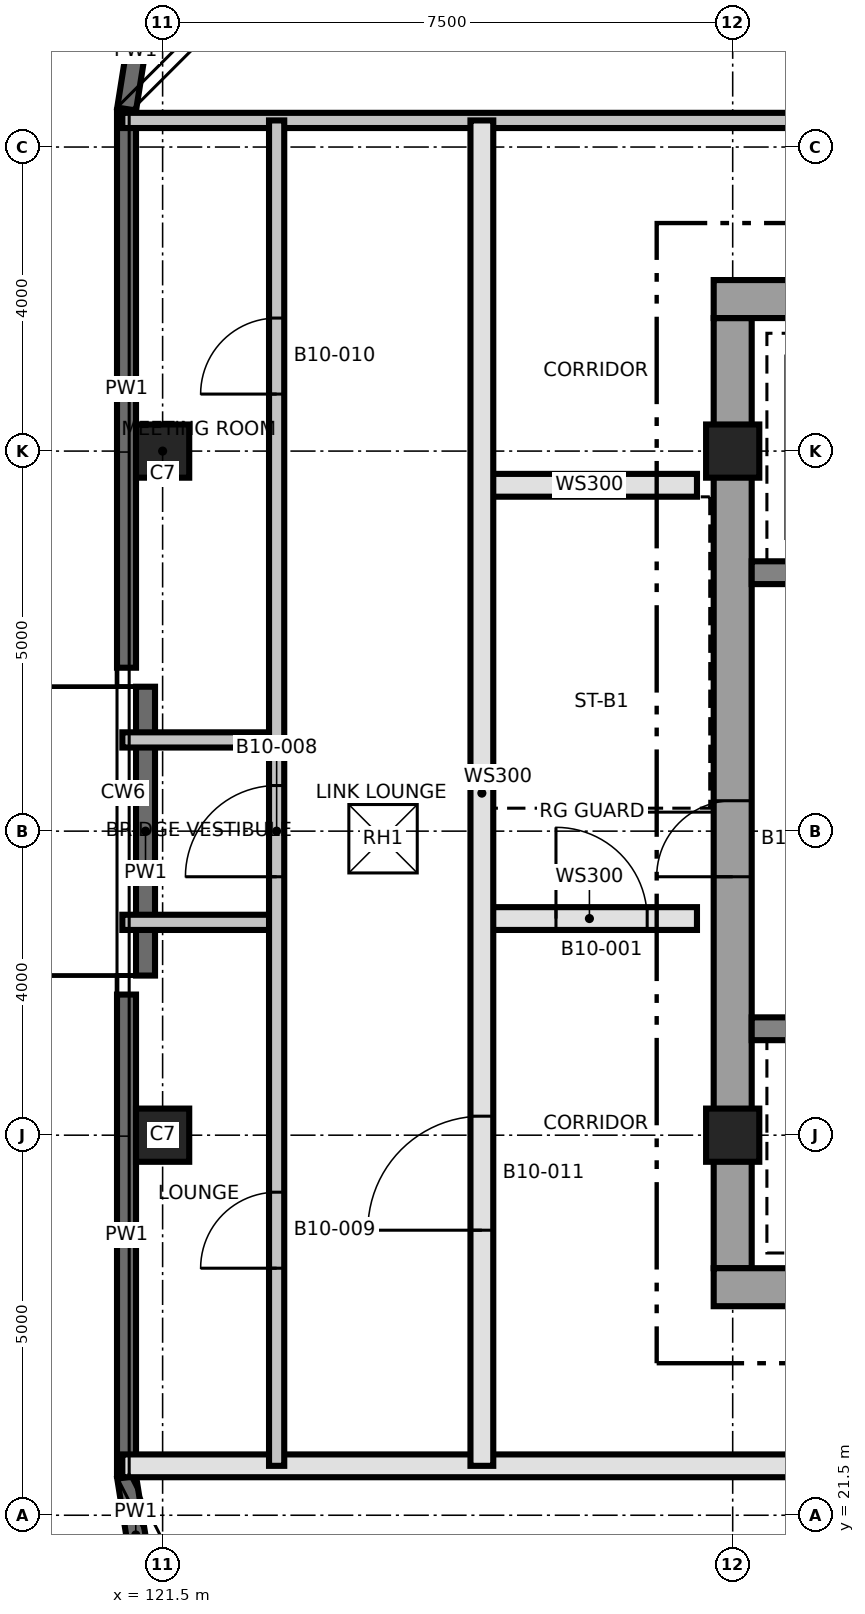
"""IFC4 building model, lengths in metres.
Left out: names, types, materials, properties, quantities, classifications, styles, units other than length and angle.
Written with IfcOpenShell. Run it as: python <this file> out.ifc"""

import sys

from ifc_helpers import new_model, si_unit, direction, frame, frame_2d, origin, origin_2d, place, context, subcontext, project, spatial, rectangle, extrude, element, fill, save


model = new_model("IFC4")
c1 = context("Model", 3, precision=1e-05, world=origin(), true_north=direction((0.0, 1.0)))
c2 = subcontext(c1, "Body", "Model", "MODEL_VIEW")
j1 = project(units=[si_unit("LENGTHUNIT", "METRE"), si_unit("PLANEANGLEUNIT", "RADIAN")], contexts=[c1])
p1 = place(None, origin())
s1 = spatial("IfcSite", under=j1, at=p1, CompositionType="ELEMENT")
p2 = place(p1, origin())
s2 = spatial("IfcBuilding", under=s1, at=p2, CompositionType="ELEMENT")
p3 = place(p2, frame((0.0, 0.0, 101.9)))
s3 = spatial("IfcBuildingStorey", under=s2, at=p3, CompositionType="ELEMENT", Elevation=101.9)
p4 = place(p3, frame((129.0, 24.75, 0.0), z_axis=(0.0, 0.0, 1.0), x_axis=(0.0, 1.0, 0.0)))
e1 = element("IfcWall", 1, at=p4, inside=s3, PredefinedType="SHEAR", context=c2, shape_type="SweptSolid", body=[
    extrude(rectangle(XDim=12.5, YDim=0.5, at=frame_2d((6.25, 0.0))), origin(), (0.0, 0.0, 1.0), 3.7),
])
p5 = place(p4, frame((5.15, 0.0, 0.0)))
e2 = element("IfcOpeningElement", 2, at=p5, cuts=e1, PredefinedType="OPENING", context=c2, shape_type="SweptSolid", body=[
    extrude(rectangle(XDim=1.0, YDim=2.1, at=frame_2d((0.5, 1.05))), frame((0.0, 0.26, 0.0), z_axis=(0.0, -1.0, 0.0), x_axis=(1.0, 0.0, 0.0)), (0.0, 0.0, 1.0), 0.52),
])
p6 = place(p3, frame((128.75, 24.5, 0.0), z_axis=(0.0, 0.0, 1.0), x_axis=(1.0, 0.0, 0.0)))
e3 = element("IfcWall", 3, at=p6, inside=s3, PredefinedType="SHEAR", context=c2, shape_type="SweptSolid", body=[
    extrude(rectangle(XDim=15.0, YDim=0.5, at=frame_2d((7.5, 0.0))), origin(), (0.0, 0.0, 1.0), 3.7),
])
p7 = place(p6, frame((9.65, 0.0, 0.0)))
e4 = element("IfcOpeningElement", 4, at=p7, cuts=e3, PredefinedType="OPENING", context=c2, shape_type="SweptSolid", body=[
    extrude(rectangle(XDim=1.5, YDim=2.1, at=frame_2d((0.75, 1.05))), frame((0.0, 0.26, 0.0), z_axis=(0.0, -1.0, 0.0), x_axis=(1.0, 0.0, 0.0)), (0.0, 0.0, 1.0), 0.52),
])
p8 = place(p6, frame((1.25, 0.0, 0.0)))
e5 = element("IfcOpeningElement", 5, at=p8, cuts=e3, PredefinedType="OPENING", context=c2, shape_type="SweptSolid", body=[
    extrude(rectangle(XDim=0.9, YDim=2.1, at=frame_2d((0.45, 1.05))), frame((0.0, 0.26, 0.0), z_axis=(0.0, -1.0, 0.0), x_axis=(1.0, 0.0, 0.0)), (0.0, 0.0, 1.0), 0.52),
])
p9 = place(p3, frame((128.75, 37.5, 0.0), z_axis=(0.0, 0.0, 1.0), x_axis=(1.0, 0.0, 0.0)))
e6 = element("IfcWall", 6, at=p9, inside=s3, PredefinedType="SHEAR", context=c2, shape_type="SweptSolid", body=[
    extrude(rectangle(XDim=15.0, YDim=0.5, at=frame_2d((7.5, 0.0))), origin(), (0.0, 0.0, 1.0), 3.7),
])
p10 = place(p9, frame((9.65, 0.0, 0.0)))
e7 = element("IfcOpeningElement", 7, at=p10, cuts=e6, PredefinedType="OPENING", context=c2, shape_type="SweptSolid", body=[
    extrude(rectangle(XDim=1.5, YDim=2.1, at=frame_2d((0.75, 1.05))), frame((0.0, 0.26, 0.0), z_axis=(0.0, -1.0, 0.0), x_axis=(1.0, 0.0, 0.0)), (0.0, 0.0, 1.0), 0.52),
])
p11 = place(p9, frame((12.85, 0.0, 0.0)))
e8 = element("IfcOpeningElement", 8, at=p11, cuts=e6, PredefinedType="OPENING", context=c2, shape_type="SweptSolid", body=[
    extrude(rectangle(XDim=0.9, YDim=2.1, at=frame_2d((0.45, 1.05))), frame((0.0, 0.26, 0.0), z_axis=(0.0, -1.0, 0.0), x_axis=(1.0, 0.0, 0.0)), (0.0, 0.0, 1.0), 0.52),
])
p12 = place(p9, frame((4.3, 0.0, 0.0)))
e9 = element("IfcOpeningElement", 9, at=p12, cuts=e6, PredefinedType="OPENING", context=c2, shape_type="SweptSolid", body=[
    extrude(rectangle(XDim=0.9, YDim=2.1, at=frame_2d((0.45, 1.05))), frame((0.0, 0.26, 0.0), z_axis=(0.0, -1.0, 0.0), x_axis=(1.0, 0.0, 0.0)), (0.0, 0.0, 1.0), 0.52),
])
p13 = place(p9, frame((7.2, 0.0, 0.0)))
e10 = element("IfcOpeningElement", 10, at=p13, cuts=e6, PredefinedType="OPENING", context=c2, shape_type="SweptSolid", body=[
    extrude(rectangle(XDim=0.9, YDim=2.1, at=frame_2d((0.45, 1.05))), frame((0.0, 0.26, 0.0), z_axis=(0.0, -1.0, 0.0), x_axis=(1.0, 0.0, 0.0)), (0.0, 0.0, 1.0), 0.52),
])
p14 = place(p3, frame((129.25, 27.9, 0.0), z_axis=(0.0, 0.0, 1.0), x_axis=(1.0, 0.0, 0.0)))
e11 = element("IfcWall", 11, at=p14, inside=s3, PredefinedType="SHEAR", context=c2, shape_type="SweptSolid", body=[
    extrude(rectangle(XDim=2.7, YDim=0.3, at=frame_2d((1.35, 0.0))), origin(), (0.0, 0.0, 1.0), 3.7),
])
p15 = place(p3, frame((129.25, 33.9, 0.0), z_axis=(0.0, 0.0, 1.0), x_axis=(1.0, 0.0, 0.0)))
e12 = element("IfcWall", 12, at=p15, inside=s3, PredefinedType="SHEAR", context=c2, shape_type="SweptSolid", body=[
    extrude(rectangle(XDim=2.7, YDim=0.3, at=frame_2d((1.35, 0.0))), origin(), (0.0, 0.0, 1.0), 3.7),
])
p16 = place(p15, frame((1.05, 0.0, 0.0)))
e13 = element("IfcOpeningElement", 13, at=p16, cuts=e12, PredefinedType="OPENING", context=c2, shape_type="SweptSolid", body=[
    extrude(rectangle(XDim=1.3, YDim=2.4, at=frame_2d((0.65, 1.2))), frame((0.0, 0.16, 0.0), z_axis=(0.0, -1.0, 0.0), x_axis=(1.0, 0.0, 0.0)), (0.0, 0.0, 1.0), 0.32),
])
for number, where, z_axis, x_axis in (
    (14, (121.5, 26.5, 0.0), (0.0, 0.0, 1.0), (1.0, 0.0, 0.0)),
    (15, (129.0, 26.5, 0.0), (0.0, 0.0, 1.0), (1.0, 0.0, 0.0)),
    (16, (121.5, 35.5, 0.0), (0.0, 0.0, 1.0), (1.0, 0.0, 0.0)),
    (17, (129.0, 35.5, 0.0), (0.0, 0.0, 1.0), (1.0, 0.0, 0.0)),
):
    element("IfcColumn", number, at=place(p3, frame(where, z_axis=z_axis, x_axis=x_axis)), inside=s3, PredefinedType="COLUMN", context=c2, shape_type="SweptSolid", body=[
        extrude(rectangle(XDim=0.7, YDim=0.7, at=origin_2d()), origin(), (0.0, 0.0, 1.0), 3.7),
    ])
p17 = place(p3, frame((121.275, 32.4, 3.7), z_axis=(0.0, 0.0, 1.0), x_axis=(0.0, -1.0, 0.0)))
e18 = element("IfcWall", 18, at=p17, inside=s3, PredefinedType="PARAPET", context=c2, shape_type="SweptSolid", body=[
    extrude(rectangle(XDim=3.8, YDim=0.25, at=frame_2d((1.9, 0.0))), origin(), (0.0, 0.0, 1.0), 1.1),
])
p18 = place(p3, frame((121.025, 28.35, 3.7), z_axis=(0.0, 0.0, 1.0), x_axis=(0.0, -1.0, 0.0)))
e19 = element("IfcWall", 19, at=p18, inside=s3, PredefinedType="PARAPET", context=c2, shape_type="SweptSolid", body=[
    extrude(rectangle(XDim=6.33, YDim=0.25, at=frame_2d((3.165, 0.0))), origin(), (0.0, 0.0, 1.0), 1.1),
])
for number, where, z_axis, x_axis in (
    (20, (121.027, 22.0, 3.7), (0.0, 0.0, 1.0), (0.156, -0.988, 0.0)),
    (21, (121.267, 41.517, 3.7), (0.0, 0.0, 1.0), (-0.156, -0.988, 0.0)),
):
    element("IfcWall", number, at=place(p3, frame(where, z_axis=z_axis, x_axis=x_axis)), inside=s3, PredefinedType="PARAPET", context=c2, shape_type="SweptSolid", body=[
        extrude(rectangle(XDim=1.536, YDim=0.25, at=frame_2d((0.768, 0.0))), origin(), (0.0, 0.0, 1.0), 1.1),
    ])
p19 = place(p3, frame((121.025, 39.98, 3.7), z_axis=(0.0, 0.0, 1.0), x_axis=(0.0, -1.0, 0.0)))
e22 = element("IfcWall", 22, at=p19, inside=s3, PredefinedType="PARAPET", context=c2, shape_type="SweptSolid", body=[
    extrude(rectangle(XDim=7.33, YDim=0.25, at=frame_2d((3.665, 0.0))), origin(), (0.0, 0.0, 1.0), 1.1),
])
p20 = place(p3, frame((120.97, 22.15, 0.0), z_axis=(0.0, 0.0, 1.0), x_axis=(1.0, 0.0, 0.0)))
e23 = element("IfcWall", 23, at=p20, inside=s3, PredefinedType="SOLIDWALL", context=c2, shape_type="SweptSolid", body=[
    extrude(rectangle(XDim=23.56, YDim=0.3, at=frame_2d((11.78, 0.0))), origin(), (0.0, 0.0, 1.0), 3.3),
])
p21 = place(p20, frame((21.78, 0.0, 0.0)))
e24 = element("IfcOpeningElement", 24, at=p21, cuts=e23, PredefinedType="OPENING", context=c2, shape_type="SweptSolid", body=[
    extrude(rectangle(XDim=1.0, YDim=2.1, at=frame_2d((0.5, 1.05))), frame((0.0, 0.16, 0.0), z_axis=(0.0, -1.0, 0.0), x_axis=(1.0, 0.0, 0.0)), (0.0, 0.0, 1.0), 0.32),
])
p22 = place(p20, frame((8.83, 0.0, 0.0)))
e25 = element("IfcOpeningElement", 25, at=p22, cuts=e23, PredefinedType="OPENING", context=c2, shape_type="SweptSolid", body=[
    extrude(rectangle(XDim=1.4, YDim=2.1, at=frame_2d((0.7, 1.05))), frame((0.0, 0.16, 0.0), z_axis=(0.0, -1.0, 0.0), x_axis=(1.0, 0.0, 0.0)), (0.0, 0.0, 1.0), 0.32),
])
p23 = place(p20, frame((15.78, 0.0, 0.0)))
e26 = element("IfcOpeningElement", 26, at=p23, cuts=e23, PredefinedType="OPENING", context=c2, shape_type="SweptSolid", body=[
    extrude(rectangle(XDim=0.9, YDim=2.1, at=frame_2d((0.45, 1.05))), frame((0.0, 0.16, 0.0), z_axis=(0.0, -1.0, 0.0), x_axis=(1.0, 0.0, 0.0)), (0.0, 0.0, 1.0), 0.32),
])
p24 = place(p3, frame((120.97, 29.3, 0.0), z_axis=(0.0, 0.0, 1.0), x_axis=(1.0, 0.0, 0.0)))
e27 = element("IfcWall", 27, at=p24, inside=s3, PredefinedType="PARTITIONING", context=c2, shape_type="SweptSolid", body=[
    extrude(rectangle(XDim=2.03, YDim=0.2, at=frame_2d((1.015, 0.0))), origin(), (0.0, 0.0, 1.0), 3.3),
])
p25 = place(p3, frame((125.7, 29.35, 0.0), z_axis=(0.0, 0.0, 1.0), x_axis=(1.0, 0.0, 0.0)))
e28 = element("IfcWall", 28, at=p25, inside=s3, PredefinedType="SOLIDWALL", context=c2, shape_type="SweptSolid", body=[
    extrude(rectangle(XDim=2.83, YDim=0.3, at=frame_2d((1.415, 0.0))), origin(), (0.0, 0.0, 1.0), 3.3),
])
p26 = place(p25, frame((0.975, 0.0, 0.0)))
e29 = element("IfcOpeningElement", 29, at=p26, cuts=e28, PredefinedType="OPENING", context=c2, shape_type="SweptSolid", body=[
    extrude(rectangle(XDim=1.2, YDim=2.1, at=frame_2d((0.6, 1.05))), frame((0.0, 0.16, 0.0), z_axis=(0.0, -1.0, 0.0), x_axis=(1.0, 0.0, 0.0)), (0.0, 0.0, 1.0), 0.32),
])
p27 = place(p3, frame((120.97, 31.7, 0.0), z_axis=(0.0, 0.0, 1.0), x_axis=(1.0, 0.0, 0.0)))
e30 = element("IfcWall", 30, at=p27, inside=s3, PredefinedType="PARTITIONING", context=c2, shape_type="SweptSolid", body=[
    extrude(rectangle(XDim=2.03, YDim=0.2, at=frame_2d((1.015, 0.0))), origin(), (0.0, 0.0, 1.0), 3.3),
])
p28 = place(p3, frame((125.7, 35.05, 0.0), z_axis=(0.0, 0.0, 1.0), x_axis=(1.0, 0.0, 0.0)))
e31 = element("IfcWall", 31, at=p28, inside=s3, PredefinedType="SOLIDWALL", context=c2, shape_type="SweptSolid", body=[
    extrude(rectangle(XDim=2.83, YDim=0.3, at=frame_2d((1.415, 0.0))), origin(), (0.0, 0.0, 1.0), 3.3),
])
p29 = place(p3, frame((120.97, 39.85, 0.0), z_axis=(0.0, 0.0, 1.0), x_axis=(1.0, 0.0, 0.0)))
e32 = element("IfcWall", 32, at=p29, inside=s3, PredefinedType="PARTITIONING", context=c2, shape_type="SweptSolid", body=[
    extrude(rectangle(XDim=23.56, YDim=0.2, at=frame_2d((11.78, 0.0))), origin(), (0.0, 0.0, 1.0), 3.3),
])
p30 = place(p29, frame((11.23, 0.0, 0.0)))
e33 = element("IfcOpeningElement", 33, at=p30, cuts=e32, PredefinedType="OPENING", context=c2, shape_type="SweptSolid", body=[
    extrude(rectangle(XDim=1.6, YDim=2.1, at=frame_2d((0.8, 1.05))), frame((0.0, 0.11, 0.0), z_axis=(0.0, -1.0, 0.0), x_axis=(1.0, 0.0, 0.0)), (0.0, 0.0, 1.0), 0.22),
])
p31 = place(p3, frame((123.0, 22.15, 0.0), z_axis=(0.0, 0.0, 1.0), x_axis=(0.0, 1.0, 0.0)))
e34 = element("IfcWall", 34, at=p31, inside=s3, PredefinedType="PARTITIONING", context=c2, shape_type="SweptSolid", body=[
    extrude(rectangle(XDim=17.7, YDim=0.2, at=frame_2d((8.85, 0.0))), origin(), (0.0, 0.0, 1.0), 3.3),
])
p32 = place(p31, frame((7.75, 0.0, 0.0)))
e35 = element("IfcOpeningElement", 35, at=p32, cuts=e34, PredefinedType="OPENING", context=c2, shape_type="SweptSolid", body=[
    extrude(rectangle(XDim=1.2, YDim=2.1, at=frame_2d((0.6, 1.05))), frame((0.0, 0.11, 0.0), z_axis=(0.0, -1.0, 0.0), x_axis=(1.0, 0.0, 0.0)), (0.0, 0.0, 1.0), 0.22),
])
p33 = place(p31, frame((2.6, 0.0, 0.0)))
e36 = element("IfcOpeningElement", 36, at=p33, cuts=e34, PredefinedType="OPENING", context=c2, shape_type="SweptSolid", body=[
    extrude(rectangle(XDim=1.0, YDim=2.1, at=frame_2d((0.5, 1.05))), frame((0.0, 0.11, 0.0), z_axis=(0.0, -1.0, 0.0), x_axis=(1.0, 0.0, 0.0)), (0.0, 0.0, 1.0), 0.22),
])
p34 = place(p31, frame((14.1, 0.0, 0.0)))
e37 = element("IfcOpeningElement", 37, at=p34, cuts=e34, PredefinedType="OPENING", context=c2, shape_type="SweptSolid", body=[
    extrude(rectangle(XDim=1.0, YDim=2.1, at=frame_2d((0.5, 1.05))), frame((0.0, 0.11, 0.0), z_axis=(0.0, -1.0, 0.0), x_axis=(1.0, 0.0, 0.0)), (0.0, 0.0, 1.0), 0.22),
])
p35 = place(p3, frame((125.7, 22.15, 0.0), z_axis=(0.0, 0.0, 1.0), x_axis=(0.0, 1.0, 0.0)))
e38 = element("IfcWall", 38, at=p35, inside=s3, PredefinedType="SOLIDWALL", context=c2, shape_type="SweptSolid", body=[
    extrude(rectangle(XDim=17.7, YDim=0.3, at=frame_2d((8.85, 0.0))), origin(), (0.0, 0.0, 1.0), 3.3),
])
p36 = place(p35, frame((3.1, 0.0, 0.0)))
e39 = element("IfcOpeningElement", 39, at=p36, cuts=e38, PredefinedType="OPENING", context=c2, shape_type="SweptSolid", body=[
    extrude(rectangle(XDim=1.5, YDim=2.1, at=frame_2d((0.75, 1.05))), frame((0.0, 0.16, 0.0), z_axis=(0.0, -1.0, 0.0), x_axis=(1.0, 0.0, 0.0)), (0.0, 0.0, 1.0), 0.32),
])
p37 = place(p3, frame((0.0, 0.0, 3.35)))
p38 = place(p37, frame((124.4, 30.4, 0.0)))
p39 = place(p38, frame((0.0, 0.0, 0.3)))
e40 = element("IfcWindow", 40, at=p39, inside=s3, PartitioningType="SINGLE_PANEL", PredefinedType="SKYLIGHT", context=c2, shape_type="SweptSolid", body=[
    extrude(rectangle(XDim=0.9, YDim=0.9, at=origin_2d()), origin(), (0.0, 0.0, 1.0), 0.05),
])
p40 = place(p26, origin())
e41 = element("IfcDoor", 41, at=p40, inside=s3, OperationType="SINGLE_SWING_LEFT", PredefinedType="DOOR", context=c2, shape_type="SweptSolid", body=[
    extrude(rectangle(XDim=1.2, YDim=2.1, at=frame_2d((0.6, 1.05))), frame((0.0, 0.025, 0.0), z_axis=(0.0, -1.0, 0.0), x_axis=(1.0, 0.0, 0.0)), (0.0, 0.0, 1.0), 0.05),
])
fill(e29, e41)
p41 = place(p32, origin())
e42 = element("IfcDoor", 42, at=p41, inside=s3, OperationType="SINGLE_SWING_LEFT", PredefinedType="DOOR", context=c2, shape_type="SweptSolid", body=[
    extrude(rectangle(XDim=1.2, YDim=2.1, at=frame_2d((0.6, 1.05))), frame((0.0, 0.025, 0.0), z_axis=(0.0, -1.0, 0.0), x_axis=(1.0, 0.0, 0.0)), (0.0, 0.0, 1.0), 0.05),
])
fill(e35, e42)
p42 = place(p33, origin())
e43 = element("IfcDoor", 43, at=p42, inside=s3, OperationType="SINGLE_SWING_RIGHT", PredefinedType="DOOR", context=c2, shape_type="SweptSolid", body=[
    extrude(rectangle(XDim=1.0, YDim=2.1, at=frame_2d((0.5, 1.05))), frame((0.0, 0.025, 0.0), z_axis=(0.0, -1.0, 0.0), x_axis=(1.0, 0.0, 0.0)), (0.0, 0.0, 1.0), 0.05),
])
fill(e36, e43)
p43 = place(p34, origin())
e44 = element("IfcDoor", 44, at=p43, inside=s3, OperationType="SINGLE_SWING_LEFT", PredefinedType="DOOR", context=c2, shape_type="SweptSolid", body=[
    extrude(rectangle(XDim=1.0, YDim=2.1, at=frame_2d((0.5, 1.05))), frame((0.0, 0.025, 0.0), z_axis=(0.0, -1.0, 0.0), x_axis=(1.0, 0.0, 0.0)), (0.0, 0.0, 1.0), 0.05),
])
fill(e37, e44)
p44 = place(p36, origin())
e45 = element("IfcDoor", 45, at=p44, inside=s3, OperationType="SINGLE_SWING_RIGHT", PredefinedType="DOOR", context=c2, shape_type="SweptSolid", body=[
    extrude(rectangle(XDim=1.5, YDim=2.1, at=frame_2d((0.75, 1.05))), frame((0.0, 0.025, 0.0), z_axis=(0.0, -1.0, 0.0), x_axis=(1.0, 0.0, 0.0)), (0.0, 0.0, 1.0), 0.05),
])
fill(e39, e45)
p45 = place(p5, origin())
e46 = element("IfcDoor", 46, at=p45, inside=s3, OperationType="SINGLE_SWING_RIGHT", PredefinedType="DOOR", context=c2, shape_type="SweptSolid", body=[
    extrude(rectangle(XDim=1.0, YDim=2.1, at=frame_2d((0.5, 1.05))), frame((0.0, 0.025, 0.0), z_axis=(0.0, -1.0, 0.0), x_axis=(1.0, 0.0, 0.0)), (0.0, 0.0, 1.0), 0.05),
])
fill(e2, e46)
save(model, sys.argv[1])
